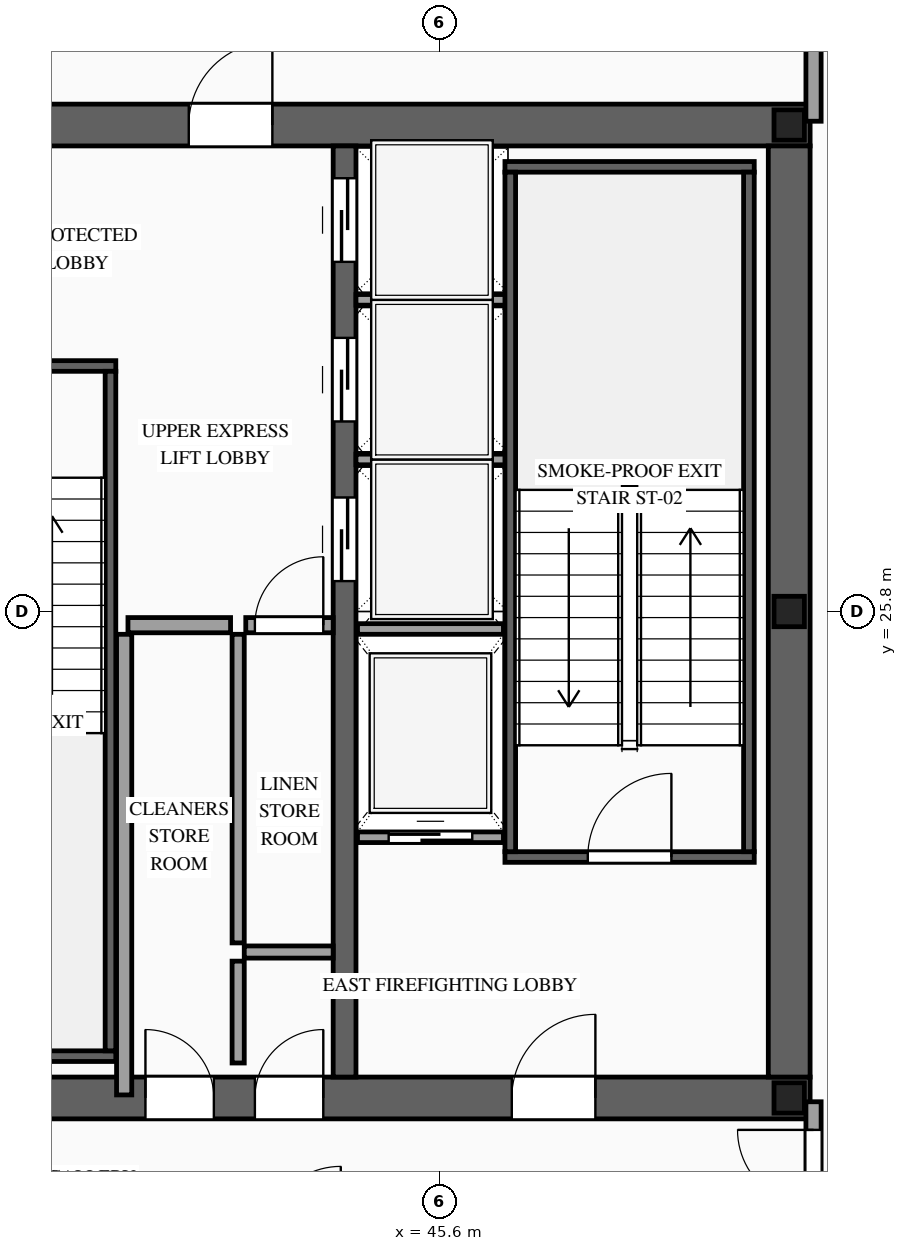
"""IFC4 building model, lengths in metres.
Left out: names, types, materials, properties, quantities, classifications, styles, units other than length and angle.
Written with IfcOpenShell. Run it as: python <this file> out.ifc"""

import sys

from ifc_helpers import new_model, si_unit, direction, frame, frame_2d, origin, origin_2d, place, context, subcontext, project, spatial, rectangle, i_section, extrude, source, transform, mapped, element, fill, save


model = new_model("IFC4")
c1 = context("Model", 3, precision=1e-05, world=origin(), true_north=direction((0.0, 1.0)))
c2 = subcontext(c1, "Body", "Model", "MODEL_VIEW")
j1 = project(units=[si_unit("LENGTHUNIT", "METRE"), si_unit("PLANEANGLEUNIT", "RADIAN")], contexts=[c1])
p1 = place(None, origin())
s1 = spatial("IfcSite", under=j1, at=p1, CompositionType="ELEMENT")
p2 = place(p1, origin())
s2 = spatial("IfcBuilding", under=s1, at=p2, CompositionType="ELEMENT")
p3 = place(p2, frame((0.0, 0.0, 259.1)))
s3 = spatial("IfcBuildingStorey", under=s2, at=p3, CompositionType="ELEMENT", Elevation=259.1)
p4 = place(p3, frame((23.525, 19.4, 0.0), z_axis=(0.0, 0.0, 1.0), x_axis=(1.0, 0.0, 0.0)))
e1 = element("IfcWall", 1, at=p4, inside=s3, PredefinedType="SHEAR", context=c2, shape_type="SweptSolid", body=[
    extrude(rectangle(XDim=26.95, YDim=0.55, at=frame_2d((13.475, 0.0))), origin(), (0.0, 0.0, 1.0), 4.4),
])
p5 = place(p4, frame((1.925, 0.0, 0.0)))
e2 = element("IfcOpeningElement", 2, at=p5, cuts=e1, PredefinedType="OPENING", context=c2, shape_type="SweptSolid", body=[
    extrude(rectangle(XDim=1.1, YDim=2.2, at=frame_2d((0.55, 1.1))), frame((0.0, 0.29, 0.0), z_axis=(0.0, -1.0, 0.0), x_axis=(1.0, 0.0, 0.0)), (0.0, 0.0, 1.0), 0.58),
])
p6 = place(p4, frame((9.825, 0.0, 0.0)))
e3 = element("IfcOpeningElement", 3, at=p6, cuts=e1, PredefinedType="OPENING", context=c2, shape_type="SweptSolid", body=[
    extrude(rectangle(XDim=1.1, YDim=2.2, at=frame_2d((0.55, 1.1))), frame((0.0, 0.29, 0.0), z_axis=(0.0, -1.0, 0.0), x_axis=(1.0, 0.0, 0.0)), (0.0, 0.0, 1.0), 0.58),
])
p7 = place(p4, frame((23.025, 0.0, 0.0)))
e4 = element("IfcOpeningElement", 4, at=p7, cuts=e1, PredefinedType="OPENING", context=c2, shape_type="SweptSolid", body=[
    extrude(rectangle(XDim=1.1, YDim=2.2, at=frame_2d((0.55, 1.1))), frame((0.0, 0.29, 0.0), z_axis=(0.0, -1.0, 0.0), x_axis=(1.0, 0.0, 0.0)), (0.0, 0.0, 1.0), 0.58),
])
p8 = place(p4, frame((19.645, 0.0, 0.0)))
e5 = element("IfcOpeningElement", 5, at=p8, cuts=e1, PredefinedType="OPENING", context=c2, shape_type="SweptSolid", body=[
    extrude(rectangle(XDim=0.9, YDim=2.15, at=frame_2d((0.45, 1.075))), frame((0.0, 0.29, 0.0), z_axis=(0.0, -1.0, 0.0), x_axis=(1.0, 0.0, 0.0)), (0.0, 0.0, 1.0), 0.58),
])
p9 = place(p4, frame((18.205, 0.0, 0.0)))
e6 = element("IfcOpeningElement", 6, at=p9, cuts=e1, PredefinedType="OPENING", context=c2, shape_type="SweptSolid", body=[
    extrude(rectangle(XDim=0.9, YDim=2.15, at=frame_2d((0.45, 1.075))), frame((0.0, 0.29, 0.0), z_axis=(0.0, -1.0, 0.0), x_axis=(1.0, 0.0, 0.0)), (0.0, 0.0, 1.0), 0.58),
])
p10 = place(p3, frame((23.525, 32.2, 0.0), z_axis=(0.0, 0.0, 1.0), x_axis=(1.0, 0.0, 0.0)))
e7 = element("IfcWall", 7, at=p10, inside=s3, PredefinedType="SHEAR", context=c2, shape_type="SweptSolid", body=[
    extrude(rectangle(XDim=26.95, YDim=0.55, at=frame_2d((13.475, 0.0))), origin(), (0.0, 0.0, 1.0), 4.4),
])
p11 = place(p10, frame((4.545, 0.0, 0.0)))
e8 = element("IfcOpeningElement", 8, at=p11, cuts=e7, PredefinedType="OPENING", context=c2, shape_type="SweptSolid", body=[
    extrude(rectangle(XDim=0.9, YDim=2.15, at=frame_2d((0.45, 1.075))), frame((0.0, 0.29, 0.0), z_axis=(0.0, -1.0, 0.0), x_axis=(1.0, 0.0, 0.0)), (0.0, 0.0, 1.0), 0.58),
])
p12 = place(p10, frame((9.825, 0.0, 0.0)))
e9 = element("IfcOpeningElement", 9, at=p12, cuts=e7, PredefinedType="OPENING", context=c2, shape_type="SweptSolid", body=[
    extrude(rectangle(XDim=1.1, YDim=2.2, at=frame_2d((0.55, 1.1))), frame((0.0, 0.29, 0.0), z_axis=(0.0, -1.0, 0.0), x_axis=(1.0, 0.0, 0.0)), (0.0, 0.0, 1.0), 0.58),
])
p13 = place(p10, frame((15.675, 0.0, 0.0)))
e10 = element("IfcOpeningElement", 10, at=p13, cuts=e7, PredefinedType="OPENING", context=c2, shape_type="SweptSolid", body=[
    extrude(rectangle(XDim=1.1, YDim=2.2, at=frame_2d((0.55, 1.1))), frame((0.0, 0.29, 0.0), z_axis=(0.0, -1.0, 0.0), x_axis=(1.0, 0.0, 0.0)), (0.0, 0.0, 1.0), 0.58),
])
p14 = place(p10, frame((18.775, 0.0, 0.0)))
e11 = element("IfcOpeningElement", 11, at=p14, cuts=e7, PredefinedType="OPENING", context=c2, shape_type="SweptSolid", body=[
    extrude(rectangle(XDim=1.1, YDim=2.2, at=frame_2d((0.55, 1.1))), frame((0.0, 0.29, 0.0), z_axis=(0.0, -1.0, 0.0), x_axis=(1.0, 0.0, 0.0)), (0.0, 0.0, 1.0), 0.58),
])
m1 = source(origin(), c2, "Body", "SweptSolid", [
    extrude(rectangle(XDim=12.25, YDim=0.55, at=frame_2d((6.125, 0.0))), origin(), (0.0, 0.0, 1.0), 4.4),
])
p15 = place(p3, frame((50.2, 19.675, 0.0), z_axis=(0.0, 0.0, 1.0), x_axis=(0.0, 1.0, 0.0)))
e12 = element("IfcWall", 12, at=p15, inside=s3, PredefinedType="SHEAR", context=c2, shape_type="MappedRepresentation", body=[
    mapped(m1, transform((0.0, 0.0, 0.0), scale=1.0)),
])
p16 = place(p3, frame((44.35, 19.675, 0.0), z_axis=(0.0, 0.0, 1.0), x_axis=(0.0, 1.0, 0.0)))
e13 = element("IfcWall", 13, at=p16, inside=s3, PredefinedType="SOLIDWALL", context=c2, shape_type="SweptSolid", body=[
    extrude(rectangle(XDim=12.25, YDim=0.3, at=frame_2d((6.125, 0.0))), origin(), (0.0, 0.0, 1.0), 4.4),
])
p17 = place(p16, frame((6.525, 0.0, 0.0)))
e14 = element("IfcOpeningElement", 14, at=p17, cuts=e13, PredefinedType="OPENING", context=c2, shape_type="SweptSolid", body=[
    extrude(rectangle(XDim=1.1, YDim=2.2, at=frame_2d((0.55, 1.1))), frame((0.0, 0.165, 0.0), z_axis=(0.0, -1.0, 0.0), x_axis=(1.0, 0.0, 0.0)), (0.0, 0.0, 1.0), 0.33),
])
p18 = place(p16, frame((8.625, 0.0, 0.0)))
e15 = element("IfcOpeningElement", 15, at=p18, cuts=e13, PredefinedType="OPENING", context=c2, shape_type="SweptSolid", body=[
    extrude(rectangle(XDim=1.1, YDim=2.2, at=frame_2d((0.55, 1.1))), frame((0.0, 0.165, 0.0), z_axis=(0.0, -1.0, 0.0), x_axis=(1.0, 0.0, 0.0)), (0.0, 0.0, 1.0), 0.33),
])
p19 = place(p16, frame((10.725, 0.0, 0.0)))
e16 = element("IfcOpeningElement", 16, at=p19, cuts=e13, PredefinedType="OPENING", context=c2, shape_type="SweptSolid", body=[
    extrude(rectangle(XDim=1.1, YDim=2.2, at=frame_2d((0.55, 1.1))), frame((0.0, 0.165, 0.0), z_axis=(0.0, -1.0, 0.0), x_axis=(1.0, 0.0, 0.0)), (0.0, 0.0, 1.0), 0.33),
])
m2 = source(origin(), c2, "Body", "SweptSolid", [
    extrude(i_section(OverallWidth=0.4, OverallDepth=0.4, WebThickness=0.013, FlangeThickness=0.021, at=origin_2d()), origin(), (0.0, 0.0, 1.0), 4.4),
])
for number, where, z_axis, x_axis in (
    (17, (50.2, 19.4, 0.0), (0.0, 0.0, 1.0), (1.0, 0.0, 0.0)),
    (18, (50.2, 25.8, 0.0), (0.0, 0.0, 1.0), (1.0, 0.0, 0.0)),
    (19, (50.2, 32.2, 0.0), (0.0, 0.0, 1.0), (1.0, 0.0, 0.0)),
):
    element("IfcColumn", number, at=place(p3, frame(where, z_axis=z_axis, x_axis=x_axis)), inside=s3, PredefinedType="COLUMN", context=c2, shape_type="MappedRepresentation", body=[
        mapped(m2, transform((0.0, 0.0, 0.0), scale=1.0)),
    ])
p20 = place(p3, frame((44.52, 22.83, 0.0), z_axis=(0.0, 0.0, 1.0), x_axis=(1.0, 0.0, 0.0)))
e20 = element("IfcWall", 20, at=p20, inside=s3, PredefinedType="SOLIDWALL", context=c2, shape_type="SweptSolid", body=[
    extrude(rectangle(XDim=1.92, YDim=0.14, at=frame_2d((0.96, 0.0))), origin(), (0.0, 0.0, 1.0), 4.12),
])
p21 = place(p20, frame((0.41, 0.0, 0.0)))
e21 = element("IfcOpeningElement", 21, at=p21, cuts=e20, PredefinedType="OPENING", context=c2, shape_type="SweptSolid", body=[
    extrude(rectangle(XDim=1.1, YDim=2.2, at=frame_2d((0.55, 1.1))), frame((0.0, 0.085, 0.0), z_axis=(0.0, -1.0, 0.0), x_axis=(1.0, 0.0, 0.0)), (0.0, 0.0, 1.0), 0.17),
])
m3 = source(origin(), c2, "Body", "SweptSolid", [
    extrude(rectangle(XDim=1.92, YDim=0.14, at=frame_2d((0.96, 0.0))), origin(), (0.0, 0.0, 1.0), 4.12),
])
p22 = place(p3, frame((44.52, 25.57, 0.0), z_axis=(0.0, 0.0, 1.0), x_axis=(1.0, 0.0, 0.0)))
e22 = element("IfcWall", 22, at=p22, inside=s3, PredefinedType="SOLIDWALL", context=c2, shape_type="MappedRepresentation", body=[
    mapped(m3, transform((0.0, 0.0, 0.0), scale=1.0)),
])
m4 = source(origin(), c2, "Body", "SweptSolid", [
    extrude(rectangle(XDim=2.0, YDim=0.14, at=frame_2d((1.0, 0.0))), origin(), (0.0, 0.0, 1.0), 4.12),
])
for number, where, z_axis, x_axis in (
    (23, (44.5, 27.8, 0.0), (0.0, 0.0, 1.0), (1.0, 0.0, 0.0)),
    (24, (44.5, 29.9, 0.0), (0.0, 0.0, 1.0), (1.0, 0.0, 0.0)),
):
    element("IfcWall", number, at=place(p3, frame(where, z_axis=z_axis, x_axis=x_axis)), inside=s3, PredefinedType="SOLIDWALL", context=c2, shape_type="MappedRepresentation", body=[
        mapped(m4, transform((0.0, 0.0, 0.0), scale=1.0)),
    ])
p23 = place(p3, frame((46.46, 22.57, 0.0), z_axis=(0.0, 0.0, 1.0), x_axis=(1.0, 0.0, 0.0)))
e25 = element("IfcWall", 25, at=p23, inside=s3, PredefinedType="SOLIDWALL", context=c2, shape_type="SweptSolid", body=[
    extrude(rectangle(XDim=3.28, YDim=0.14, at=frame_2d((1.64, 0.0))), origin(), (0.0, 0.0, 1.0), 4.12),
])
p24 = place(p23, frame((1.09, 0.0, 0.0)))
e26 = element("IfcOpeningElement", 26, at=p24, cuts=e25, PredefinedType="OPENING", context=c2, shape_type="SweptSolid", body=[
    extrude(rectangle(XDim=1.1, YDim=2.2, at=frame_2d((0.55, 1.1))), frame((0.0, 0.085, 0.0), z_axis=(0.0, -1.0, 0.0), x_axis=(1.0, 0.0, 0.0)), (0.0, 0.0, 1.0), 0.17),
])
m5 = source(origin(), c2, "Body", "SweptSolid", [
    extrude(rectangle(XDim=3.28, YDim=0.14, at=frame_2d((1.64, 0.0))), origin(), (0.0, 0.0, 1.0), 4.12),
])
p25 = place(p3, frame((46.46, 31.65, 0.0), z_axis=(0.0, 0.0, 1.0), x_axis=(1.0, 0.0, 0.0)))
e27 = element("IfcWall", 27, at=p25, inside=s3, PredefinedType="SOLIDWALL", context=c2, shape_type="MappedRepresentation", body=[
    mapped(m5, transform((0.0, 0.0, 0.0), scale=1.0)),
])
m6 = source(origin(), c2, "Body", "SweptSolid", [
    extrude(rectangle(XDim=8.94, YDim=0.14, at=frame_2d((4.47, 0.0))), origin(), (0.0, 0.0, 1.0), 4.12),
])
for number, where, z_axis, x_axis in (
    (28, (46.53, 22.64, 0.0), (0.0, 0.0, 1.0), (0.0, 1.0, 0.0)),
    (29, (49.67, 22.64, 0.0), (0.0, 0.0, 1.0), (0.0, 1.0, 0.0)),
):
    element("IfcWall", number, at=place(p3, frame(where, z_axis=z_axis, x_axis=x_axis)), inside=s3, PredefinedType="SOLIDWALL", context=c2, shape_type="MappedRepresentation", body=[
        mapped(m6, transform((0.0, 0.0, 0.0), scale=1.0)),
    ])
p26 = place(p3, frame((38.2, 29.03, 0.0), z_axis=(0.0, 0.0, 1.0), x_axis=(1.0, 0.0, 0.0)))
e30 = element("IfcWall", 30, at=p26, inside=s3, PredefinedType="SOLIDWALL", context=c2, shape_type="SweptSolid", body=[
    extrude(rectangle(XDim=3.14, YDim=0.14, at=frame_2d((1.57, 0.0))), origin(), (0.0, 0.0, 1.0), 4.12),
])
p27 = place(p26, frame((1.02, 0.0, 0.0)))
e31 = element("IfcOpeningElement", 31, at=p27, cuts=e30, PredefinedType="OPENING", context=c2, shape_type="SweptSolid", body=[
    extrude(rectangle(XDim=1.1, YDim=2.2, at=frame_2d((0.55, 1.1))), frame((0.0, 0.085, 0.0), z_axis=(0.0, -1.0, 0.0), x_axis=(1.0, 0.0, 0.0)), (0.0, 0.0, 1.0), 0.17),
])
m7 = source(origin(), c2, "Body", "SweptSolid", [
    extrude(rectangle(XDim=3.14, YDim=0.14, at=frame_2d((1.57, 0.0))), origin(), (0.0, 0.0, 1.0), 4.12),
])
p28 = place(p3, frame((38.2, 19.95, 0.0), z_axis=(0.0, 0.0, 1.0), x_axis=(1.0, 0.0, 0.0)))
e32 = element("IfcWall", 32, at=p28, inside=s3, PredefinedType="SOLIDWALL", context=c2, shape_type="MappedRepresentation", body=[
    mapped(m7, transform((0.0, 0.0, 0.0), scale=1.0)),
])
m8 = source(origin(), c2, "Body", "SweptSolid", [
    extrude(rectangle(XDim=8.94, YDim=0.14, at=frame_2d((4.47, 0.0))), origin(), (0.0, 0.0, 1.0), 4.12),
])
p29 = place(p3, frame((41.27, 20.02, 0.0), z_axis=(0.0, 0.0, 1.0), x_axis=(0.0, 1.0, 0.0)))
e33 = element("IfcWall", 33, at=p29, inside=s3, PredefinedType="SOLIDWALL", context=c2, shape_type="MappedRepresentation", body=[
    mapped(m8, transform((0.0, 0.0, 0.0), scale=1.0)),
])
m9 = source(origin(), c2, "Body", "SweptSolid", [
    extrude(rectangle(XDim=1.34, YDim=0.16, at=frame_2d((0.67, 0.0))), origin(), (0.0, 0.0, 1.0), 4.12),
])
p30 = place(p3, frame((42.95, 19.86, 0.0), z_axis=(0.0, 0.0, 1.0), x_axis=(0.0, 1.0, 0.0)))
e34 = element("IfcWall", 34, at=p30, inside=s3, PredefinedType="PARTITIONING", context=c2, shape_type="MappedRepresentation", body=[
    mapped(m9, transform((0.0, 0.0, 0.0), scale=1.0)),
])
m10 = source(origin(), c2, "Body", "SweptSolid", [
    extrude(rectangle(XDim=1.17, YDim=0.16, at=frame_2d((0.585, 0.0))), origin(), (0.0, 0.0, 1.0), 4.12),
])
p31 = place(p3, frame((43.03, 21.32, 0.0), z_axis=(0.0, 0.0, 1.0), x_axis=(1.0, 0.0, 0.0)))
e35 = element("IfcWall", 35, at=p31, inside=s3, PredefinedType="PARTITIONING", context=c2, shape_type="MappedRepresentation", body=[
    mapped(m10, transform((0.0, 0.0, 0.0), scale=1.0)),
])
m11 = source(origin(), c2, "Body", "SweptSolid", [
    extrude(rectangle(XDim=6.06, YDim=0.2, at=frame_2d((3.03, 0.0))), origin(), (0.0, 0.0, 1.0), 4.12),
])
p32 = place(p3, frame((41.45, 19.44, 0.0), z_axis=(0.0, 0.0, 1.0), x_axis=(0.0, 1.0, 0.0)))
e36 = element("IfcWall", 36, at=p32, inside=s3, PredefinedType="PARTITIONING", context=c2, shape_type="MappedRepresentation", body=[
    mapped(m11, transform((0.0, 0.0, 0.0), scale=1.0)),
])
m12 = source(origin(), c2, "Body", "SweptSolid", [
    extrude(rectangle(XDim=1.35, YDim=0.2, at=frame_2d((0.675, 0.0))), origin(), (0.0, 0.0, 1.0), 4.12),
])
p33 = place(p3, frame((41.5, 25.62, 0.0), z_axis=(0.0, 0.0, 1.0), x_axis=(1.0, 0.0, 0.0)))
e37 = element("IfcWall", 37, at=p33, inside=s3, PredefinedType="PARTITIONING", context=c2, shape_type="MappedRepresentation", body=[
    mapped(m12, transform((0.0, 0.0, 0.0), scale=1.0)),
])
m13 = source(origin(), c2, "Body", "SweptSolid", [
    extrude(rectangle(XDim=4.06, YDim=0.16, at=frame_2d((2.03, 0.0))), origin(), (0.0, 0.0, 1.0), 4.12),
])
p34 = place(p3, frame((42.95, 21.44, 0.0), z_axis=(0.0, 0.0, 1.0), x_axis=(0.0, 1.0, 0.0)))
e38 = element("IfcWall", 38, at=p34, inside=s3, PredefinedType="PARTITIONING", context=c2, shape_type="MappedRepresentation", body=[
    mapped(m13, transform((0.0, 0.0, 0.0), scale=1.0)),
])
p35 = place(p3, frame((43.05, 25.62, 0.0), z_axis=(0.0, 0.0, 1.0), x_axis=(1.0, 0.0, 0.0)))
e39 = element("IfcWall", 39, at=p35, inside=s3, PredefinedType="PARTITIONING", context=c2, shape_type="SweptSolid", body=[
    extrude(rectangle(XDim=1.15, YDim=0.2, at=frame_2d((0.575, 0.0))), origin(), (0.0, 0.0, 1.0), 4.12),
])
p36 = place(p35, frame((0.12, 0.0, 0.0)))
e40 = element("IfcOpeningElement", 40, at=p36, cuts=e39, PredefinedType="OPENING", context=c2, shape_type="SweptSolid", body=[
    extrude(rectangle(XDim=0.9, YDim=2.15, at=frame_2d((0.45, 1.075))), frame((0.0, 0.115, 0.0), z_axis=(0.0, -1.0, 0.0), x_axis=(1.0, 0.0, 0.0)), (0.0, 0.0, 1.0), 0.23),
])
p37 = place(p3, frame((50.52, 17.61, 0.0), z_axis=(0.0, 0.0, 1.0), x_axis=(0.0, 1.0, 0.0)))
e41 = element("IfcWall", 41, at=p37, inside=s3, PredefinedType="PARTITIONING", context=c2, shape_type="SweptSolid", body=[
    extrude(rectangle(XDim=1.74, YDim=0.2, at=frame_2d((0.87, 0.0))), origin(), (0.0, 0.0, 1.0), 4.12),
])
p38 = place(p37, frame((0.37, 0.0, 0.0)))
e42 = element("IfcOpeningElement", 42, at=p38, cuts=e41, PredefinedType="OPENING", context=c2, shape_type="SweptSolid", body=[
    extrude(rectangle(XDim=1.0, YDim=2.2, at=frame_2d((0.5, 1.1))), frame((0.0, 0.115, 0.0), z_axis=(0.0, -1.0, 0.0), x_axis=(1.0, 0.0, 0.0)), (0.0, 0.0, 1.0), 0.23),
])
m14 = source(origin(), c2, "Body", "SweptSolid", [
    extrude(rectangle(XDim=1.74, YDim=0.2, at=frame_2d((0.87, 0.0))), origin(), (0.0, 0.0, 1.0), 4.12),
])
p39 = place(p3, frame((50.52, 32.25, 0.0), z_axis=(0.0, 0.0, 1.0), x_axis=(0.0, 1.0, 0.0)))
e43 = element("IfcWall", 43, at=p39, inside=s3, PredefinedType="PARTITIONING", context=c2, shape_type="MappedRepresentation", body=[
    mapped(m14, transform((0.0, 0.0, 0.0), scale=1.0)),
])
m15 = source(origin(), c2, "Body", "SweptSolid", [
    extrude(rectangle(XDim=1.1, YDim=2.2, at=frame_2d((0.55, 1.1))), frame((0.0, 0.025, 0.0), z_axis=(0.0, -1.0, 0.0), x_axis=(1.0, 0.0, 0.0)), (0.0, 0.0, 1.0), 0.05),
])
p40 = place(p21, origin())
e44 = element("IfcDoor", 44, at=p40, inside=s3, OperationType="SLIDING_TO_RIGHT", PredefinedType="DOOR", context=c2, shape_type="MappedRepresentation", body=[
    mapped(m15, transform((0.0, 0.0, 0.0), scale=1.0)),
])
fill(e21, e44)
p41 = place(p17, origin())
e45 = element("IfcDoor", 45, at=p41, inside=s3, OperationType="SLIDING_TO_LEFT", PredefinedType="DOOR", context=c2, shape_type="MappedRepresentation", body=[
    mapped(m15, transform((0.0, 0.0, 0.0), scale=1.0)),
])
fill(e14, e45)
p42 = place(p18, origin())
e46 = element("IfcDoor", 46, at=p42, inside=s3, OperationType="SLIDING_TO_RIGHT", PredefinedType="DOOR", context=c2, shape_type="MappedRepresentation", body=[
    mapped(m15, transform((0.0, 0.0, 0.0), scale=1.0)),
])
fill(e15, e46)
p43 = place(p19, origin())
e47 = element("IfcDoor", 47, at=p43, inside=s3, OperationType="SLIDING_TO_LEFT", PredefinedType="DOOR", context=c2, shape_type="MappedRepresentation", body=[
    mapped(m15, transform((0.0, 0.0, 0.0), scale=1.0)),
])
fill(e16, e47)
m16 = source(origin(), c2, "Body", "SweptSolid", [
    extrude(rectangle(XDim=1.1, YDim=2.2, at=frame_2d((0.55, 1.1))), frame((0.0, 0.025, 0.0), z_axis=(0.0, -1.0, 0.0), x_axis=(1.0, 0.0, 0.0)), (0.0, 0.0, 1.0), 0.05),
])
p44 = place(p24, origin())
e48 = element("IfcDoor", 48, at=p44, inside=s3, OperationType="SINGLE_SWING_RIGHT", PredefinedType="DOOR", context=c2, shape_type="MappedRepresentation", body=[
    mapped(m16, transform((0.0, 0.0, 0.0), scale=1.0)),
])
fill(e26, e48)
p45 = place(p7, origin())
e49 = element("IfcDoor", 49, at=p45, inside=s3, OperationType="SINGLE_SWING_RIGHT", PredefinedType="DOOR", context=c2, shape_type="MappedRepresentation", body=[
    mapped(m16, transform((0.0, 0.0, 0.0), scale=1.0)),
])
fill(e4, e49)
p46 = place(p14, origin())
e50 = element("IfcDoor", 50, at=p46, inside=s3, OperationType="SINGLE_SWING_RIGHT", PredefinedType="DOOR", context=c2, shape_type="MappedRepresentation", body=[
    mapped(m16, transform((0.0, 0.0, 0.0), scale=1.0)),
])
fill(e11, e50)
m17 = source(origin(), c2, "Body", "SweptSolid", [
    extrude(rectangle(XDim=0.9, YDim=2.15, at=frame_2d((0.45, 1.075))), frame((0.0, 0.025, 0.0), z_axis=(0.0, -1.0, 0.0), x_axis=(1.0, 0.0, 0.0)), (0.0, 0.0, 1.0), 0.05),
])
p47 = place(p8, origin())
e51 = element("IfcDoor", 51, at=p47, inside=s3, OperationType="SINGLE_SWING_RIGHT", PredefinedType="DOOR", context=c2, shape_type="MappedRepresentation", body=[
    mapped(m17, transform((0.0, 0.0, 0.0), scale=1.0)),
])
fill(e5, e51)
p48 = place(p9, origin())
e52 = element("IfcDoor", 52, at=p48, inside=s3, OperationType="SINGLE_SWING_LEFT", PredefinedType="DOOR", context=c2, shape_type="MappedRepresentation", body=[
    mapped(m17, transform((0.0, 0.0, 0.0), scale=1.0)),
])
fill(e6, e52)
p49 = place(p36, origin())
e53 = element("IfcDoor", 53, at=p49, inside=s3, OperationType="SINGLE_SWING_RIGHT", PredefinedType="DOOR", context=c2, shape_type="MappedRepresentation", body=[
    mapped(m17, transform((0.0, 0.0, 0.0), scale=1.0)),
])
fill(e40, e53)
m18 = source(origin(), c2, "Body", "SweptSolid", [
    extrude(rectangle(XDim=1.0, YDim=2.2, at=frame_2d((0.5, 1.1))), frame((0.0, 0.025, 0.0), z_axis=(0.0, -1.0, 0.0), x_axis=(1.0, 0.0, 0.0)), (0.0, 0.0, 1.0), 0.05),
])
p50 = place(p38, origin())
e54 = element("IfcDoor", 54, at=p50, inside=s3, OperationType="SINGLE_SWING_RIGHT", PredefinedType="DOOR", context=c2, shape_type="MappedRepresentation", body=[
    mapped(m18, transform((0.0, 0.0, 0.0), scale=1.0)),
])
fill(e42, e54)
save(model, sys.argv[1])
